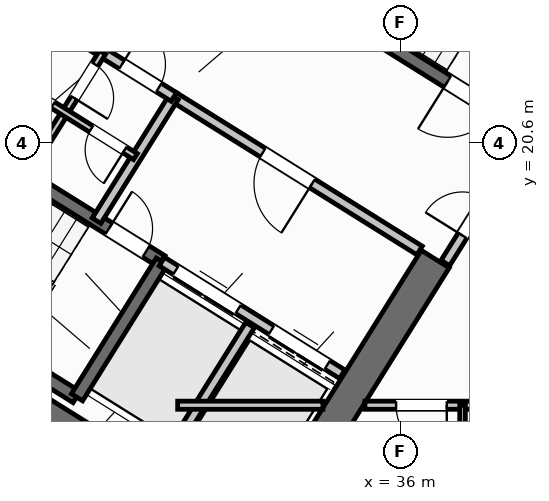
"""IFC4 building model, lengths in metres.
Left out: names, types, materials, properties, quantities, classifications, styles, units other than length and angle.
Written with IfcOpenShell. Run it as: python <this file> out.ifc"""

import sys

from ifc_helpers import new_model, si_unit, direction, frame, frame_2d, origin, place, context, subcontext, project, spatial, rectangle, extrude, source, transform, mapped, element, fill, save


model = new_model("IFC4")
c1 = context("Model", 3, precision=1e-05, world=origin(), true_north=direction((0.0, 1.0)))
c2 = subcontext(c1, "Body", "Model", "MODEL_VIEW")
j1 = project(units=[si_unit("LENGTHUNIT", "METRE"), si_unit("PLANEANGLEUNIT", "RADIAN")], contexts=[c1])
p1 = place(None, origin())
s1 = spatial("IfcSite", under=j1, at=p1, CompositionType="ELEMENT")
p2 = place(p1, origin())
s2 = spatial("IfcBuilding", under=s1, at=p2, CompositionType="ELEMENT")
p3 = place(p2, frame((0.0, 0.0, 52.8)))
s3 = spatial("IfcBuildingStorey", under=s2, at=p3, CompositionType="ELEMENT", Elevation=52.8)
p4 = place(p3, frame((33.409, 12.45, 0.0), z_axis=(0.0, 0.0, 1.0), x_axis=(-0.848051132073, 0.529914405721, 0.0)))
e1 = element("IfcWall", 1, at=p4, inside=s3, PredefinedType="SHEAR", context=c2, shape_type="SweptSolid", body=[
    extrude(rectangle(XDim=13.24, YDim=0.65, at=frame_2d((6.62, 0.0))), origin(), (0.0, 0.0, 1.0), 3.35),
])
p5 = place(p3, frame((36.683, 18.304, 0.0), z_axis=(0.0, 0.0, 1.0), x_axis=(-0.529899109053, -0.848060690178, 0.0)))
e2 = element("IfcWall", 2, at=p5, inside=s3, PredefinedType="SHEAR", context=c2, shape_type="SweptSolid", body=[
    extrude(rectangle(XDim=6.375, YDim=0.65, at=frame_2d((3.188, 0.0))), origin(), (0.0, 0.0, 1.0), 3.35),
])
p6 = place(p3, frame((29.268, 6.429, 0.0), z_axis=(0.0, 0.0, 1.0), x_axis=(-0.848049971435, 0.529916263149, 0.0)))
e3 = element("IfcWall", 3, at=p6, inside=s3, PredefinedType="STANDARD", context=c2, shape_type="SweptSolid", body=[
    extrude(rectangle(XDim=31.588, YDim=0.32, at=frame_2d((15.794, 0.0))), origin(), (0.0, 0.0, 1.0), 3.35),
])
p7 = place(p6, frame((16.362, 0.0, 0.0)))
e4 = element("IfcOpeningElement", 4, at=p7, cuts=e3, PredefinedType="OPENING", context=c2, shape_type="SweptSolid", body=[
    extrude(rectangle(XDim=1.2, YDim=2.15, at=frame_2d((0.6, 1.075))), frame((0.0, 0.17, 0.0), z_axis=(0.0, -1.0, 0.0), x_axis=(1.0, 0.0, 0.0)), (0.0, 0.0, 1.0), 0.34),
])
p8 = place(p6, frame((2.989, 0.0, 0.8)))
e5 = element("IfcOpeningElement", 5, at=p8, cuts=e3, PredefinedType="OPENING", context=c2, shape_type="SweptSolid", body=[
    extrude(rectangle(XDim=2.1, YDim=1.55, at=frame_2d((1.05, 0.775))), frame((0.0, 0.17, 0.0), z_axis=(0.0, -1.0, 0.0), x_axis=(1.0, 0.0, 0.0)), (0.0, 0.0, 1.0), 0.34),
])
p9 = place(p6, frame((8.359, 0.0, 0.8)))
e6 = element("IfcOpeningElement", 6, at=p9, cuts=e3, PredefinedType="OPENING", context=c2, shape_type="SweptSolid", body=[
    extrude(rectangle(XDim=2.1, YDim=1.55, at=frame_2d((1.05, 0.775))), frame((0.0, 0.17, 0.0), z_axis=(0.0, -1.0, 0.0), x_axis=(1.0, 0.0, 0.0)), (0.0, 0.0, 1.0), 0.34),
])
p10 = place(p6, frame((13.284, 0.0, 0.95)))
e7 = element("IfcOpeningElement", 7, at=p10, cuts=e3, PredefinedType="OPENING", context=c2, shape_type="SweptSolid", body=[
    extrude(rectangle(XDim=1.2, YDim=1.4, at=frame_2d((0.6, 0.7))), frame((0.0, 0.17, 0.0), z_axis=(0.0, -1.0, 0.0), x_axis=(1.0, 0.0, 0.0)), (0.0, 0.0, 1.0), 0.34),
])
p11 = place(p6, frame((20.259, 0.0, 0.95)))
e8 = element("IfcOpeningElement", 8, at=p11, cuts=e3, PredefinedType="OPENING", context=c2, shape_type="SweptSolid", body=[
    extrude(rectangle(XDim=1.2, YDim=1.4, at=frame_2d((0.6, 0.7))), frame((0.0, 0.17, 0.0), z_axis=(0.0, -1.0, 0.0), x_axis=(1.0, 0.0, 0.0)), (0.0, 0.0, 1.0), 0.34),
])
p12 = place(p6, frame((22.929, 0.0, 0.95)))
e9 = element("IfcOpeningElement", 9, at=p12, cuts=e3, PredefinedType="OPENING", context=c2, shape_type="SweptSolid", body=[
    extrude(rectangle(XDim=1.2, YDim=1.4, at=frame_2d((0.6, 0.7))), frame((0.0, 0.17, 0.0), z_axis=(0.0, -1.0, 0.0), x_axis=(1.0, 0.0, 0.0)), (0.0, 0.0, 1.0), 0.34),
])
p13 = place(p6, frame((26.106, 0.0, 0.85)))
e10 = element("IfcOpeningElement", 10, at=p13, cuts=e3, PredefinedType="OPENING", context=c2, shape_type="SweptSolid", body=[
    extrude(rectangle(XDim=1.5, YDim=1.5, at=frame_2d((0.75, 0.75))), frame((0.0, 0.17, 0.0), z_axis=(0.0, -1.0, 0.0), x_axis=(1.0, 0.0, 0.0)), (0.0, 0.0, 1.0), 0.34),
])
p14 = place(p6, frame((29.068, 0.0, 0.85)))
e11 = element("IfcOpeningElement", 11, at=p14, cuts=e3, PredefinedType="OPENING", context=c2, shape_type="SweptSolid", body=[
    extrude(rectangle(XDim=1.8, YDim=1.5, at=frame_2d((0.9, 0.75))), frame((0.0, 0.17, 0.0), z_axis=(0.0, -1.0, 0.0), x_axis=(1.0, 0.0, 0.0)), (0.0, 0.0, 1.0), 0.34),
])
p15 = place(p3, frame((29.605, 15.581, 0.0), z_axis=(0.0, 0.0, 1.0), x_axis=(-0.848036911448, 0.529937163087, 0.0)))
e12 = element("IfcWall", 12, at=p15, inside=s3, PredefinedType="SHEAR", context=c2, shape_type="SweptSolid", body=[
    extrude(rectangle(XDim=7.46, YDim=0.26, at=frame_2d((3.73, 0.0))), origin(), (0.0, 0.0, 1.0), 3.35),
])
p16 = place(p3, frame((31.28, 18.261, 0.0), z_axis=(0.0, 0.0, 1.0), x_axis=(-0.848051618787, 0.529913626805, 0.0)))
e13 = element("IfcWall", 13, at=p16, inside=s3, PredefinedType="SHEAR", context=c2, shape_type="SweptSolid", body=[
    extrude(rectangle(XDim=7.46, YDim=0.26, at=frame_2d((3.73, 0.0))), origin(), (0.0, 0.0, 1.0), 3.35),
])
p17 = place(p16, frame((0.36, 0.0, 0.0)))
e14 = element("IfcOpeningElement", 14, at=p17, cuts=e13, PredefinedType="OPENING", context=c2, shape_type="SweptSolid", body=[
    extrude(rectangle(XDim=0.86, YDim=2.05, at=frame_2d((0.43, 1.025))), frame((0.0, 0.14, 0.0), z_axis=(0.0, -1.0, 0.0), x_axis=(1.0, 0.0, 0.0)), (0.0, 0.0, 1.0), 0.28),
])
p18 = place(p3, frame((31.288, 18.256, 0.0), z_axis=(0.0, 0.0, 1.0), x_axis=(-0.529943379326, -0.848033026897, 0.0)))
e15 = element("IfcWall", 15, at=p18, inside=s3, PredefinedType="SHEAR", context=c2, shape_type="SweptSolid", body=[
    extrude(rectangle(XDim=3.16, YDim=0.26, at=frame_2d((1.58, 0.0))), origin(), (0.0, 0.0, 1.0), 3.35),
])
p19 = place(p3, frame((38.046, 21.108, 0.0), z_axis=(0.0, 0.0, 1.0), x_axis=(-0.848054434086, 0.529909121291, 0.0)))
e16 = element("IfcWall", 16, at=p19, inside=s3, PredefinedType="SHEAR", context=c2, shape_type="SweptSolid", body=[
    extrude(rectangle(XDim=7.33, YDim=0.26, at=frame_2d((3.665, 0.0))), origin(), (0.0, 0.0, 1.0), 3.35),
])
p20 = place(p19, frame((0.22, 0.0, 0.0)))
e17 = element("IfcOpeningElement", 17, at=p20, cuts=e16, PredefinedType="OPENING", context=c2, shape_type="SweptSolid", body=[
    extrude(rectangle(XDim=1.1, YDim=2.1, at=frame_2d((0.55, 1.05))), frame((0.0, 0.14, 0.0), z_axis=(0.0, -1.0, 0.0), x_axis=(1.0, 0.0, 0.0)), (0.0, 0.0, 1.0), 0.28),
])
p21 = place(p3, frame((34.848, 16.031, 0.0), z_axis=(0.0, 0.0, 1.0), x_axis=(-0.848044042236, 0.529925751807, 0.0)))
e18 = element("IfcWall", 18, at=p21, inside=s3, PredefinedType="STANDARD", context=c2, shape_type="SweptSolid", body=[
    extrude(rectangle(XDim=4.198, YDim=0.2, at=frame_2d((2.099, 0.0))), origin(), (0.0, 0.0, 1.0), 3.34),
])
p22 = place(p21, frame((0.348, 0.0, 0.0)))
e19 = element("IfcOpeningElement", 19, at=p22, cuts=e18, PredefinedType="OPENING", context=c2, shape_type="SweptSolid", body=[
    extrude(rectangle(XDim=1.3, YDim=2.2, at=frame_2d((0.65, 1.1))), frame((0.0, 0.11, 0.0), z_axis=(0.0, -1.0, 0.0), x_axis=(1.0, 0.0, 0.0)), (0.0, 0.0, 1.0), 0.22),
])
p23 = place(p21, frame((2.423, 0.0, 0.0)))
e20 = element("IfcOpeningElement", 20, at=p23, cuts=e18, PredefinedType="OPENING", context=c2, shape_type="SweptSolid", body=[
    extrude(rectangle(XDim=1.45, YDim=2.25, at=frame_2d((0.725, 1.125))), frame((0.0, 0.11, 0.0), z_axis=(0.0, -1.0, 0.0), x_axis=(1.0, 0.0, 0.0)), (0.0, 0.0, 1.0), 0.22),
])
p24 = place(p3, frame((36.374, 18.474, 0.0), z_axis=(0.0, 0.0, 1.0), x_axis=(-0.848051071577, 0.529914502535, 0.0)))
e21 = element("IfcWall", 21, at=p24, inside=s3, PredefinedType="STANDARD", context=c2, shape_type="SweptSolid", body=[
    extrude(rectangle(XDim=5.718, YDim=0.2, at=frame_2d((2.859, 0.0))), origin(), (0.0, 0.0, 1.0), 3.34),
])
p25 = place(p24, frame((2.498, 0.0, 0.0)))
e22 = element("IfcOpeningElement", 22, at=p25, cuts=e21, PredefinedType="OPENING", context=c2, shape_type="SweptSolid", body=[
    extrude(rectangle(XDim=1.15, YDim=2.1, at=frame_2d((0.575, 1.05))), frame((0.0, 0.11, 0.0), z_axis=(0.0, -1.0, 0.0), x_axis=(1.0, 0.0, 0.0)), (0.0, 0.0, 1.0), 0.22),
])
p26 = place(p3, frame((33.029, 17.003, 0.0), z_axis=(0.0, 0.0, 1.0), x_axis=(-0.529916267533, -0.848049968695, 0.0)))
e23 = element("IfcWall", 23, at=p26, inside=s3, PredefinedType="STANDARD", context=c2, shape_type="SweptSolid", body=[
    extrude(rectangle(XDim=2.92, YDim=0.2, at=frame_2d((1.46, 0.0))), origin(), (0.0, 0.0, 1.0), 3.34),
])
p27 = place(p3, frame((31.525, 21.504, 0.0), z_axis=(0.0, 0.0, 1.0), x_axis=(-0.529907497854, -0.848055448493, 0.0)))
e24 = element("IfcWall", 24, at=p27, inside=s3, PredefinedType="STANDARD", context=c2, shape_type="SweptSolid", body=[
    extrude(rectangle(XDim=2.88, YDim=0.2, at=frame_2d((1.44, 0.0))), origin(), (0.0, 0.0, 1.0), 3.34),
])
p28 = place(p3, frame((31.525, 21.504, 0.0), z_axis=(0.0, 0.0, 1.0), x_axis=(-0.848044998614, 0.529924221305, 0.0)))
e25 = element("IfcWall", 25, at=p28, inside=s3, PredefinedType="STANDARD", context=c2, shape_type="SweptSolid", body=[
    extrude(rectangle(XDim=6.168, YDim=0.2, at=frame_2d((3.084, 0.0))), origin(), (0.0, 0.0, 1.0), 3.34),
])
p29 = place(p28, frame((4.4, 0.0, 0.0)))
e26 = element("IfcOpeningElement", 26, at=p29, cuts=e25, PredefinedType="OPENING", context=c2, shape_type="SweptSolid", body=[
    extrude(rectangle(XDim=0.86, YDim=2.05, at=frame_2d((0.43, 1.025))), frame((0.0, 0.11, 0.0), z_axis=(0.0, -1.0, 0.0), x_axis=(1.0, 0.0, 0.0)), (0.0, 0.0, 1.0), 0.22),
])
p30 = place(p28, frame((0.35, 0.0, 0.0)))
e27 = element("IfcOpeningElement", 27, at=p30, cuts=e25, PredefinedType="OPENING", context=c2, shape_type="SweptSolid", body=[
    extrude(rectangle(XDim=0.86, YDim=2.05, at=frame_2d((0.43, 1.025))), frame((0.0, 0.11, 0.0), z_axis=(0.0, -1.0, 0.0), x_axis=(1.0, 0.0, 0.0)), (0.0, 0.0, 1.0), 0.22),
])
p31 = place(p3, frame((30.117, 22.384, 0.0), z_axis=(0.0, 0.0, 1.0), x_axis=(-0.529951914384, -0.848027693204, 0.0)))
e28 = element("IfcWall", 28, at=p31, inside=s3, PredefinedType="PLUMBINGWALL", context=c2, shape_type="SweptSolid", body=[
    extrude(rectangle(XDim=1.4, YDim=0.14, at=frame_2d((0.7, 0.0))), origin(), (0.0, 0.0, 1.0), 3.34),
])
p32 = place(p31, frame((0.28, 0.0, 0.0)))
e29 = element("IfcOpeningElement", 29, at=p32, cuts=e28, PredefinedType="OPENING", context=c2, shape_type="SweptSolid", body=[
    extrude(rectangle(XDim=0.78, YDim=2.05, at=frame_2d((0.39, 1.025))), frame((0.0, 0.08, 0.0), z_axis=(0.0, -1.0, 0.0), x_axis=(1.0, 0.0, 0.0)), (0.0, 0.0, 1.0), 0.16),
])
p33 = place(p3, frame((29.375, 21.196, 0.0), z_axis=(0.0, 0.0, 1.0), x_axis=(-0.529865479138, -0.848081702443, 0.0)))
e30 = element("IfcWall", 30, at=p33, inside=s3, PredefinedType="PLUMBINGWALL", context=c2, shape_type="SweptSolid", body=[
    extrude(rectangle(XDim=1.48, YDim=0.14, at=frame_2d((0.74, 0.0))), origin(), (0.0, 0.0, 1.0), 3.34),
])
p34 = place(p3, frame((30.766, 20.327, 0.0), z_axis=(0.0, 0.0, 1.0), x_axis=(-0.848052663127, 0.529911955482, 0.0)))
e31 = element("IfcWall", 31, at=p34, inside=s3, PredefinedType="PLUMBINGWALL", context=c2, shape_type="SweptSolid", body=[
    extrude(rectangle(XDim=3.28, YDim=0.14, at=frame_2d((1.64, 0.0))), origin(), (0.0, 0.0, 1.0), 3.34),
])
p35 = place(p34, frame((0.25, 0.0, 0.0)))
e32 = element("IfcOpeningElement", 32, at=p35, cuts=e31, PredefinedType="OPENING", context=c2, shape_type="SweptSolid", body=[
    extrude(rectangle(XDim=0.78, YDim=2.05, at=frame_2d((0.39, 1.025))), frame((0.0, 0.08, 0.0), z_axis=(0.0, -1.0, 0.0), x_axis=(1.0, 0.0, 0.0)), (0.0, 0.0, 1.0), 0.16),
])
p36 = place(p34, frame((1.92, 0.0, 0.0)))
e33 = element("IfcOpeningElement", 33, at=p36, cuts=e31, PredefinedType="OPENING", context=c2, shape_type="SweptSolid", body=[
    extrude(rectangle(XDim=0.78, YDim=2.05, at=frame_2d((0.39, 1.025))), frame((0.0, 0.08, 0.0), z_axis=(0.0, -1.0, 0.0), x_axis=(1.0, 0.0, 0.0)), (0.0, 0.0, 1.0), 0.16),
])
p37 = place(p3, frame((32.164, 10.374, 0.0), z_axis=(0.0, 0.0, 1.0), x_axis=(-0.848044107957, 0.529925646633, 0.0)))
e34 = element("IfcWall", 34, at=p37, inside=s3, PredefinedType="PARTITIONING", context=c2, shape_type="SweptSolid", body=[
    extrude(rectangle(XDim=15.57, YDim=0.16, at=frame_2d((7.785, 0.0))), origin(), (0.0, 0.0, 1.0), 3.34),
])
p38 = place(p37, frame((10.83, 0.0, 0.0)))
e35 = element("IfcOpeningElement", 35, at=p38, cuts=e34, PredefinedType="OPENING", context=c2, shape_type="SweptSolid", body=[
    extrude(rectangle(XDim=1.0, YDim=2.1, at=frame_2d((0.5, 1.05))), frame((0.0, 0.09, 0.0), z_axis=(0.0, -1.0, 0.0), x_axis=(1.0, 0.0, 0.0)), (0.0, 0.0, 1.0), 0.18),
])
p39 = place(p3, frame((29.72, 8.859, 0.0), z_axis=(0.0, 0.0, 1.0), x_axis=(-0.848049134363, 0.529917602752, 0.0)))
e36 = element("IfcWall", 36, at=p39, inside=s3, PredefinedType="PLUMBINGWALL", context=c2, shape_type="SweptSolid", body=[
    extrude(rectangle(XDim=14.3, YDim=0.14, at=frame_2d((7.15, 0.0))), origin(), (0.0, 0.0, 1.0), 3.34),
])
p40 = place(p39, frame((9.57, 0.0, 0.0)))
e37 = element("IfcOpeningElement", 37, at=p40, cuts=e36, PredefinedType="OPENING", context=c2, shape_type="SweptSolid", body=[
    extrude(rectangle(XDim=0.92, YDim=2.08, at=frame_2d((0.46, 1.04))), frame((0.0, 0.08, 0.0), z_axis=(0.0, -1.0, 0.0), x_axis=(1.0, 0.0, 0.0)), (0.0, 0.0, 1.0), 0.16),
])
p41 = place(p3, frame((38.451, 20.737, 0.0), z_axis=(0.0, 0.0, 1.0), x_axis=(-0.529924799939, -0.848044637038, 0.0)))
e38 = element("IfcWall", 38, at=p41, inside=s3, PredefinedType="STANDARD", context=c2, shape_type="SweptSolid", body=[
    extrude(rectangle(XDim=2.96, YDim=0.2, at=frame_2d((1.48, 0.0))), origin(), (0.0, 0.0, 1.0), 3.34),
])
p42 = place(p41, frame((1.46, 0.0, 0.0)))
e39 = element("IfcOpeningElement", 39, at=p42, cuts=e38, PredefinedType="OPENING", context=c2, shape_type="SweptSolid", body=[
    extrude(rectangle(XDim=0.86, YDim=2.05, at=frame_2d((0.43, 1.025))), frame((0.0, 0.11, 0.0), z_axis=(0.0, -1.0, 0.0), x_axis=(1.0, 0.0, 0.0)), (0.0, 0.0, 1.0), 0.22),
])
p43 = place(p3, frame((31.6, 15.42, 0.0), z_axis=(0.0, 0.0, 1.0), x_axis=(1.0, 0.0, 0.0)))
e40 = element("IfcWall", 40, at=p43, inside=s3, PredefinedType="PARTITIONING", context=c2, shape_type="SweptSolid", body=[
    extrude(rectangle(XDim=2.866, YDim=0.16, at=frame_2d((1.433, 0.0))), origin(), (0.0, 0.0, 1.0), 3.34),
])
p44 = place(p3, frame((35.296, 15.42, 0.0), z_axis=(0.0, 0.0, 1.0), x_axis=(1.0, 0.0, 0.0)))
e41 = element("IfcWall", 41, at=p44, inside=s3, PredefinedType="PARTITIONING", context=c2, shape_type="SweptSolid", body=[
    extrude(rectangle(XDim=15.311, YDim=0.16, at=frame_2d((7.655, 0.0))), origin(), (0.0, 0.0, 1.0), 3.34),
])
p45 = place(p44, frame((0.615, 0.0, 0.0)))
e42 = element("IfcOpeningElement", 42, at=p45, cuts=e41, PredefinedType="OPENING", context=c2, shape_type="SweptSolid", body=[
    extrude(rectangle(XDim=1.0, YDim=2.1, at=frame_2d((0.5, 1.05))), frame((0.0, 0.09, 0.0), z_axis=(0.0, -1.0, 0.0), x_axis=(1.0, 0.0, 0.0)), (0.0, 0.0, 1.0), 0.18),
])
p46 = place(p44, frame((9.035, 0.0, 0.0)))
e43 = element("IfcOpeningElement", 43, at=p46, cuts=e41, PredefinedType="OPENING", context=c2, shape_type="SweptSolid", body=[
    extrude(rectangle(XDim=1.0, YDim=2.1, at=frame_2d((0.5, 1.05))), frame((0.0, 0.09, 0.0), z_axis=(0.0, -1.0, 0.0), x_axis=(1.0, 0.0, 0.0)), (0.0, 0.0, 1.0), 0.18),
])
p47 = place(p3, frame((37.222, 1.96, 0.0), z_axis=(0.0, 0.0, 1.0), x_axis=(0.0, 1.0, 0.0)))
e44 = element("IfcWall", 44, at=p47, inside=s3, PredefinedType="PARTITIONING", context=c2, shape_type="SweptSolid", body=[
    extrude(rectangle(XDim=13.46, YDim=0.11, at=frame_2d((6.73, 0.0))), origin(), (0.0, 0.0, 1.0), 3.34),
])
p48 = place(p47, frame((5.2, 0.0, 0.0)))
e45 = element("IfcOpeningElement", 45, at=p48, cuts=e44, PredefinedType="OPENING", context=c2, shape_type="SweptSolid", body=[
    extrude(rectangle(XDim=0.92, YDim=2.08, at=frame_2d((0.46, 1.04))), frame((0.0, 0.065, 0.0), z_axis=(0.0, -1.0, 0.0), x_axis=(1.0, 0.0, 0.0)), (0.0, 0.0, 1.0), 0.13),
])
p49 = place(p47, frame((10.89, 0.0, 0.0)))
e46 = element("IfcOpeningElement", 46, at=p49, cuts=e44, PredefinedType="OPENING", context=c2, shape_type="SweptSolid", body=[
    extrude(rectangle(XDim=0.88, YDim=2.08, at=frame_2d((0.44, 1.04))), frame((0.0, 0.065, 0.0), z_axis=(0.0, -1.0, 0.0), x_axis=(1.0, 0.0, 0.0)), (0.0, 0.0, 1.0), 0.13),
])
m1 = source(origin(), c2, "Body", "SweptSolid", [
    extrude(rectangle(XDim=0.86, YDim=2.05, at=frame_2d((0.43, 1.025))), frame((0.0, 0.025, 0.0), z_axis=(0.0, -1.0, 0.0), x_axis=(1.0, 0.0, 0.0)), (0.0, 0.0, 1.0), 0.05),
])
p50 = place(p17, frame((0.86, 0.0, 0.0), z_axis=(0.0, 0.0, 1.0), x_axis=(-1.0, 0.0, 0.0)))
e47 = element("IfcDoor", 47, at=p50, inside=s3, OperationType="SINGLE_SWING_LEFT", PredefinedType="DOOR", context=c2, shape_type="MappedRepresentation", body=[
    mapped(m1, transform((0.0, 0.0, 0.0), scale=1.0)),
])
fill(e14, e47)
m2 = source(origin(), c2, "Body", "SweptSolid", [
    extrude(rectangle(XDim=1.1, YDim=2.1, at=frame_2d((0.55, 1.05))), frame((0.0, 0.025, 0.0), z_axis=(0.0, -1.0, 0.0), x_axis=(1.0, 0.0, 0.0)), (0.0, 0.0, 1.0), 0.05),
])
p51 = place(p20, origin())
e48 = element("IfcDoor", 48, at=p51, inside=s3, OperationType="SINGLE_SWING_RIGHT", PredefinedType="DOOR", context=c2, shape_type="MappedRepresentation", body=[
    mapped(m2, transform((0.0, 0.0, 0.0), scale=1.0)),
])
fill(e17, e48)
m3 = source(origin(), c2, "Body", "SweptSolid", [
    extrude(rectangle(XDim=1.15, YDim=2.1, at=frame_2d((0.575, 1.05))), frame((0.0, 0.025, 0.0), z_axis=(0.0, -1.0, 0.0), x_axis=(1.0, 0.0, 0.0)), (0.0, 0.0, 1.0), 0.05),
])
p52 = place(p25, origin())
e49 = element("IfcDoor", 49, at=p52, inside=s3, OperationType="SINGLE_SWING_LEFT", PredefinedType="DOOR", context=c2, shape_type="MappedRepresentation", body=[
    mapped(m3, transform((0.0, 0.0, 0.0), scale=1.0)),
])
fill(e22, e49)
m4 = source(origin(), c2, "Body", "SweptSolid", [
    extrude(rectangle(XDim=1.3, YDim=2.2, at=frame_2d((0.65, 1.1))), frame((0.0, 0.025, 0.0), z_axis=(0.0, -1.0, 0.0), x_axis=(1.0, 0.0, 0.0)), (0.0, 0.0, 1.0), 0.05),
])
p53 = place(p22, origin())
e50 = element("IfcDoor", 50, at=p53, inside=s3, OperationType="DOUBLE_DOOR_SLIDING", PredefinedType="DOOR", context=c2, shape_type="MappedRepresentation", body=[
    mapped(m4, transform((0.0, 0.0, 0.0), scale=1.0)),
])
fill(e19, e50)
m5 = source(origin(), c2, "Body", "SweptSolid", [
    extrude(rectangle(XDim=1.45, YDim=2.25, at=frame_2d((0.725, 1.125))), frame((0.0, 0.025, 0.0), z_axis=(0.0, -1.0, 0.0), x_axis=(1.0, 0.0, 0.0)), (0.0, 0.0, 1.0), 0.05),
])
p54 = place(p23, origin())
e51 = element("IfcDoor", 51, at=p54, inside=s3, OperationType="DOUBLE_DOOR_SLIDING", PredefinedType="DOOR", context=c2, shape_type="MappedRepresentation", body=[
    mapped(m5, transform((0.0, 0.0, 0.0), scale=1.0)),
])
fill(e20, e51)
p55 = place(p30, frame((0.86, 0.0, 0.0), z_axis=(0.0, 0.0, 1.0), x_axis=(-1.0, 0.0, 0.0)))
e52 = element("IfcDoor", 52, at=p55, inside=s3, OperationType="SINGLE_SWING_LEFT", PredefinedType="DOOR", context=c2, shape_type="MappedRepresentation", body=[
    mapped(m1, transform((0.0, 0.0, 0.0), scale=1.0)),
])
fill(e27, e52)
m6 = source(origin(), c2, "Body", "SweptSolid", [
    extrude(rectangle(XDim=0.78, YDim=2.05, at=frame_2d((0.39, 1.025))), frame((0.0, 0.025, 0.0), z_axis=(0.0, -1.0, 0.0), x_axis=(1.0, 0.0, 0.0)), (0.0, 0.0, 1.0), 0.05),
])
p56 = place(p32, origin())
e53 = element("IfcDoor", 53, at=p56, inside=s3, OperationType="SINGLE_SWING_RIGHT", PredefinedType="DOOR", context=c2, shape_type="MappedRepresentation", body=[
    mapped(m6, transform((0.0, 0.0, 0.0), scale=1.0)),
])
fill(e29, e53)
p57 = place(p35, origin())
e54 = element("IfcDoor", 54, at=p57, inside=s3, OperationType="SINGLE_SWING_LEFT", PredefinedType="DOOR", context=c2, shape_type="MappedRepresentation", body=[
    mapped(m6, transform((0.0, 0.0, 0.0), scale=1.0)),
])
fill(e32, e54)
p58 = place(p36, origin())
e55 = element("IfcDoor", 55, at=p58, inside=s3, OperationType="SINGLE_SWING_RIGHT", PredefinedType="DOOR", context=c2, shape_type="MappedRepresentation", body=[
    mapped(m6, transform((0.0, 0.0, 0.0), scale=1.0)),
])
fill(e33, e55)
p59 = place(p42, frame((0.86, 0.0, 0.0), z_axis=(0.0, 0.0, 1.0), x_axis=(-1.0, 0.0, 0.0)))
e56 = element("IfcDoor", 56, at=p59, inside=s3, OperationType="SINGLE_SWING_LEFT", PredefinedType="DOOR", context=c2, shape_type="MappedRepresentation", body=[
    mapped(m1, transform((0.0, 0.0, 0.0), scale=1.0)),
])
fill(e39, e56)
m7 = source(origin(), c2, "Body", "SweptSolid", [
    extrude(rectangle(XDim=1.0, YDim=2.1, at=frame_2d((0.5, 1.05))), frame((0.0, 0.025, 0.0), z_axis=(0.0, -1.0, 0.0), x_axis=(1.0, 0.0, 0.0)), (0.0, 0.0, 1.0), 0.05),
])
p60 = place(p45, frame((1.0, 0.0, 0.0), z_axis=(0.0, 0.0, 1.0), x_axis=(-1.0, 0.0, 0.0)))
e57 = element("IfcDoor", 57, at=p60, inside=s3, OperationType="SINGLE_SWING_LEFT", PredefinedType="DOOR", context=c2, shape_type="MappedRepresentation", body=[
    mapped(m7, transform((0.0, 0.0, 0.0), scale=1.0)),
])
fill(e42, e57)
save(model, sys.argv[1])
